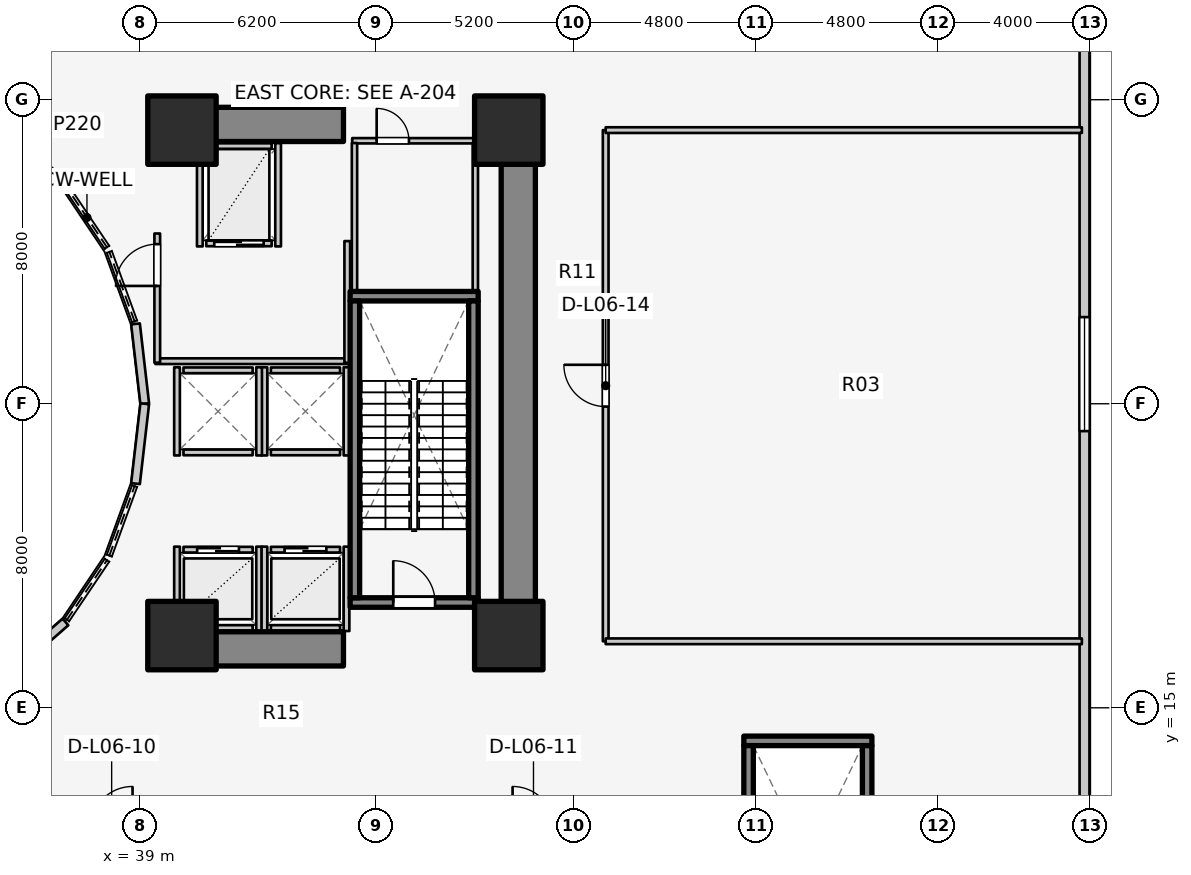
"""IFC4 building model, lengths in metres.
Left out: names, types, materials, properties, quantities, classifications, styles, units other than length and angle.
Written with IfcOpenShell. Run it as: python <this file> out.ifc"""

import sys

from ifc_helpers import new_model, si_unit, direction, frame, frame_2d, origin, origin_2d, place, context, subcontext, project, spatial, rectangle, extrude, element, fill, save


model = new_model("IFC4")
c1 = context("Model", 3, precision=1e-05, world=origin(), true_north=direction((0.0, 1.0)))
c2 = subcontext(c1, "Body", "Model", "MODEL_VIEW")
j1 = project(units=[si_unit("LENGTHUNIT", "METRE"), si_unit("PLANEANGLEUNIT", "RADIAN")], contexts=[c1])
p1 = place(None, origin())
s1 = spatial("IfcSite", under=j1, at=p1, CompositionType="ELEMENT")
p2 = place(p1, origin())
s2 = spatial("IfcBuilding", under=s1, at=p2, CompositionType="ELEMENT")
p3 = place(p2, frame((0.0, 0.0, 23.0)))
s3 = spatial("IfcBuildingStorey", under=s2, at=p3, CompositionType="ELEMENT", Elevation=23.0)
p4 = place(p3, frame((48.95, 17.05, 0.0), z_axis=(0.0, 0.0, 1.0), x_axis=(0.0, 1.0, 0.0)))
e1 = element("IfcWall", 1, at=p4, inside=s3, PredefinedType="SHEAR", context=c2, shape_type="SweptSolid", body=[
    extrude(rectangle(XDim=12.8, YDim=0.9, at=frame_2d((6.4, 0.0))), origin(), (0.0, 0.0, 1.0), 4.6),
])
for number, where, z_axis, x_axis in (
    (2, (39.85, 16.55, 0.0), (0.0, 0.0, 1.0), (1.0, 0.0, 0.0)),
    (3, (39.85, 30.35, 0.0), (0.0, 0.0, 1.0), (1.0, 0.0, 0.0)),
):
    element("IfcWall", number, at=place(p3, frame(where, z_axis=z_axis, x_axis=x_axis)), inside=s3, PredefinedType="SHEAR", context=c2, shape_type="SweptSolid", body=[
        extrude(rectangle(XDim=4.5, YDim=0.9, at=frame_2d((2.25, 0.0))), origin(), (0.0, 0.0, 1.0), 4.6),
    ])
p5 = place(p3, frame((44.525, 17.77, 0.0), z_axis=(0.0, 0.0, 1.0), x_axis=(1.0, 0.0, 0.0)))
e4 = element("IfcWall", 4, at=p5, inside=s3, PredefinedType="SOLIDWALL", context=c2, shape_type="SweptSolid", body=[
    extrude(rectangle(XDim=3.37, YDim=0.25, at=frame_2d((1.685, 0.0))), origin(), (0.0, 0.0, 1.0), 4.6),
])
p6 = place(p5, frame((1.135, 0.0, 0.0)))
e5 = element("IfcOpeningElement", 5, at=p6, cuts=e4, PredefinedType="OPENING", context=c2, shape_type="SweptSolid", body=[
    extrude(rectangle(XDim=1.1, YDim=2.1, at=frame_2d((0.55, 1.05))), frame((0.0, 0.135, 0.0), z_axis=(0.0, -1.0, 0.0), x_axis=(1.0, 0.0, 0.0)), (0.0, 0.0, 1.0), 0.27),
])
p7 = place(p3, frame((44.525, 25.83, 0.0), z_axis=(0.0, 0.0, 1.0), x_axis=(1.0, 0.0, 0.0)))
e6 = element("IfcWall", 6, at=p7, inside=s3, PredefinedType="SOLIDWALL", context=c2, shape_type="SweptSolid", body=[
    extrude(rectangle(XDim=3.37, YDim=0.25, at=frame_2d((1.685, 0.0))), origin(), (0.0, 0.0, 1.0), 4.6),
])
for number, where, z_axis, x_axis in (
    (7, (44.65, 17.895, 0.0), (0.0, 0.0, 1.0), (0.0, 1.0, 0.0)),
    (8, (47.77, 17.895, 0.0), (0.0, 0.0, 1.0), (0.0, 1.0, 0.0)),
):
    element("IfcWall", number, at=place(p3, frame(where, z_axis=z_axis, x_axis=x_axis)), inside=s3, PredefinedType="SOLIDWALL", context=c2, shape_type="SweptSolid", body=[
        extrude(rectangle(XDim=7.81, YDim=0.25, at=frame_2d((3.905, 0.0))), origin(), (0.0, 0.0, 1.0), 4.6),
    ])
p8 = place(p3, frame((54.885, 14.13, 0.0), z_axis=(0.0, 0.0, 1.0), x_axis=(1.0, 0.0, 0.0)))
e9 = element("IfcWall", 9, at=p8, inside=s3, PredefinedType="SOLIDWALL", context=c2, shape_type="SweptSolid", body=[
    extrude(rectangle(XDim=3.37, YDim=0.25, at=frame_2d((1.685, 0.0))), origin(), (0.0, 0.0, 1.0), 4.6),
])
for number, where, z_axis, x_axis in (
    (10, (55.01, 6.195, 0.0), (0.0, 0.0, 1.0), (0.0, 1.0, 0.0)),
    (11, (58.13, 6.195, 0.0), (0.0, 0.0, 1.0), (0.0, 1.0, 0.0)),
):
    element("IfcWall", number, at=place(p3, frame(where, z_axis=z_axis, x_axis=x_axis)), inside=s3, PredefinedType="SOLIDWALL", context=c2, shape_type="SweptSolid", body=[
        extrude(rectangle(XDim=7.81, YDim=0.25, at=frame_2d((3.905, 0.0))), origin(), (0.0, 0.0, 1.0), 4.6),
    ])
for number, where, z_axis, x_axis in (
    (12, (40.1, 16.9, 0.0), (0.0, 0.0, 1.0), (1.0, 0.0, 0.0)),
    (13, (48.7, 16.9, 0.0), (0.0, 0.0, 1.0), (1.0, 0.0, 0.0)),
    (14, (48.7, 30.2, 0.0), (0.0, 0.0, 1.0), (1.0, 0.0, 0.0)),
    (15, (40.1, 30.2, 0.0), (0.0, 0.0, 1.0), (1.0, 0.0, 0.0)),
):
    element("IfcColumn", number, at=place(p3, frame(where, z_axis=z_axis, x_axis=x_axis)), inside=s3, PredefinedType="COLUMN", context=c2, shape_type="SweptSolid", body=[
        extrude(rectangle(XDim=1.8, YDim=1.8, at=origin_2d()), origin(), (0.0, 0.0, 1.0), 4.6),
    ])
p9 = place(p3, frame((63.85, 0.28, 0.0), z_axis=(0.0, 0.0, 1.0), x_axis=(0.0, 1.0, 0.0)))
e16 = element("IfcWall", 16, at=p9, inside=s3, PredefinedType="STANDARD", context=c2, shape_type="SweptSolid", body=[
    extrude(rectangle(XDim=45.44, YDim=0.26, at=frame_2d((22.72, 0.0))), origin(), (0.0, 0.0, 1.0), 4.1),
])
p10 = place(p9, frame((6.0, 0.0, 0.9)))
e17 = element("IfcOpeningElement", 17, at=p10, cuts=e16, PredefinedType="OPENING", context=c2, shape_type="SweptSolid", body=[
    extrude(rectangle(XDim=3.0, YDim=2.4, at=frame_2d((1.5, 1.2))), frame((0.0, 0.14, 0.0), z_axis=(0.0, -1.0, 0.0), x_axis=(1.0, 0.0, 0.0)), (0.0, 0.0, 1.0), 0.28),
])
p11 = place(p9, frame((22.0, 0.0, 0.9)))
e18 = element("IfcOpeningElement", 18, at=p11, cuts=e16, PredefinedType="OPENING", context=c2, shape_type="SweptSolid", body=[
    extrude(rectangle(XDim=3.0, YDim=2.4, at=frame_2d((1.5, 1.2))), frame((0.0, 0.14, 0.0), z_axis=(0.0, -1.0, 0.0), x_axis=(1.0, 0.0, 0.0)), (0.0, 0.0, 1.0), 0.28),
])
p12 = place(p9, frame((38.0, 0.0, 0.9)))
e19 = element("IfcOpeningElement", 19, at=p12, cuts=e16, PredefinedType="OPENING", context=c2, shape_type="SweptSolid", body=[
    extrude(rectangle(XDim=3.0, YDim=2.4, at=frame_2d((1.5, 1.2))), frame((0.0, 0.14, 0.0), z_axis=(0.0, -1.0, 0.0), x_axis=(1.0, 0.0, 0.0)), (0.0, 0.0, 1.0), 0.28),
])
p13 = place(p3, frame((39.12, 23.0, 0.0), z_axis=(0.0, 0.0, 1.0), x_axis=(-0.114711713601, 0.993398823617, 0.0)))
e20 = element("IfcWall", 20, at=p13, inside=s3, PredefinedType="STANDARD", context=c2, shape_type="SweptSolid", body=[
    extrude(rectangle(XDim=2.115, YDim=0.23, at=frame_2d((1.058, 0.0))), origin(), (0.0, 0.0, 1.0), 2.67),
])
for number, where, z_axis, x_axis in (
    (21, (37.035, 28.742, 0.0), (0.0, 0.0, 1.0), (-0.753, 0.659, 0.0)),
    (22, (35.56, 15.968, 0.0), (0.0, 0.0, 1.0), (0.753, 0.659, 0.0)),
):
    element("IfcWall", number, at=place(p3, frame(where, z_axis=z_axis, x_axis=x_axis)), inside=s3, PredefinedType="STANDARD", context=c2, shape_type="SweptSolid", body=[
        extrude(rectangle(XDim=1.959, YDim=0.23, at=frame_2d((0.98, 0.0))), origin(), (0.0, 0.0, 1.0), 2.67),
    ])
p14 = place(p3, frame((38.877, 20.898, 0.0), z_axis=(0.0, 0.0, 1.0), x_axis=(0.114711713601, 0.993398823617, 0.0)))
e23 = element("IfcWall", 23, at=p14, inside=s3, PredefinedType="STANDARD", context=c2, shape_type="SweptSolid", body=[
    extrude(rectangle(XDim=2.115, YDim=0.23, at=frame_2d((1.058, 0.0))), origin(), (0.0, 0.0, 1.0), 2.67),
])
p15 = place(p3, frame((40.14, 19.16, 0.0), z_axis=(0.0, 0.0, 1.0), x_axis=(1.0, 0.0, 0.0)))
e24 = element("IfcWall", 24, at=p15, inside=s3, PredefinedType="SOLIDWALL", context=c2, shape_type="SweptSolid", body=[
    extrude(rectangle(XDim=1.82, YDim=0.15, at=frame_2d((0.91, 0.0))), origin(), (0.0, 0.0, 1.0), 3.62),
])
p16 = place(p15, frame((0.36, 0.0, 0.0)))
e25 = element("IfcOpeningElement", 25, at=p16, cuts=e24, PredefinedType="OPENING", context=c2, shape_type="SweptSolid", body=[
    extrude(rectangle(XDim=1.1, YDim=2.1, at=frame_2d((0.55, 1.05))), frame((0.0, 0.085, 0.0), z_axis=(0.0, -1.0, 0.0), x_axis=(1.0, 0.0, 0.0)), (0.0, 0.0, 1.0), 0.17),
])
p17 = place(p3, frame((40.14, 17.1, 0.0), z_axis=(0.0, 0.0, 1.0), x_axis=(1.0, 0.0, 0.0)))
e26 = element("IfcWall", 26, at=p17, inside=s3, PredefinedType="SOLIDWALL", context=c2, shape_type="SweptSolid", body=[
    extrude(rectangle(XDim=1.82, YDim=0.15, at=frame_2d((0.91, 0.0))), origin(), (0.0, 0.0, 1.0), 2.67),
])
p18 = place(p3, frame((39.97, 17.02, 0.0), z_axis=(0.0, 0.0, 1.0), x_axis=(0.0, 1.0, 0.0)))
e27 = element("IfcWall", 27, at=p18, inside=s3, PredefinedType="SOLIDWALL", context=c2, shape_type="SweptSolid", body=[
    extrude(rectangle(XDim=2.22, YDim=0.15, at=frame_2d((1.11, 0.0))), origin(), (0.0, 0.0, 1.0), 2.67),
])
p19 = place(p3, frame((42.13, 17.02, 0.0), z_axis=(0.0, 0.0, 1.0), x_axis=(0.0, 1.0, 0.0)))
e28 = element("IfcWall", 28, at=p19, inside=s3, PredefinedType="SOLIDWALL", context=c2, shape_type="SweptSolid", body=[
    extrude(rectangle(XDim=2.22, YDim=0.15, at=frame_2d((1.11, 0.0))), origin(), (0.0, 0.0, 1.0), 4.075),
])
p20 = place(p3, frame((42.44, 19.16, 0.0), z_axis=(0.0, 0.0, 1.0), x_axis=(1.0, 0.0, 0.0)))
e29 = element("IfcWall", 29, at=p20, inside=s3, PredefinedType="SOLIDWALL", context=c2, shape_type="SweptSolid", body=[
    extrude(rectangle(XDim=1.82, YDim=0.15, at=frame_2d((0.91, 0.0))), origin(), (0.0, 0.0, 1.0), 4.075),
])
p21 = place(p20, frame((0.36, 0.0, 0.0)))
e30 = element("IfcOpeningElement", 30, at=p21, cuts=e29, PredefinedType="OPENING", context=c2, shape_type="SweptSolid", body=[
    extrude(rectangle(XDim=1.1, YDim=2.1, at=frame_2d((0.55, 1.05))), frame((0.0, 0.085, 0.0), z_axis=(0.0, -1.0, 0.0), x_axis=(1.0, 0.0, 0.0)), (0.0, 0.0, 1.0), 0.17),
])
p22 = place(p3, frame((42.44, 17.1, 0.0), z_axis=(0.0, 0.0, 1.0), x_axis=(1.0, 0.0, 0.0)))
e31 = element("IfcWall", 31, at=p22, inside=s3, PredefinedType="SOLIDWALL", context=c2, shape_type="SweptSolid", body=[
    extrude(rectangle(XDim=1.82, YDim=0.15, at=frame_2d((0.91, 0.0))), origin(), (0.0, 0.0, 1.0), 4.075),
])
p23 = place(p3, frame((42.27, 17.02, 0.0), z_axis=(0.0, 0.0, 1.0), x_axis=(0.0, 1.0, 0.0)))
e32 = element("IfcWall", 32, at=p23, inside=s3, PredefinedType="SOLIDWALL", context=c2, shape_type="SweptSolid", body=[
    extrude(rectangle(XDim=2.22, YDim=0.15, at=frame_2d((1.11, 0.0))), origin(), (0.0, 0.0, 1.0), 4.075),
])
p24 = place(p3, frame((44.43, 17.02, 0.0), z_axis=(0.0, 0.0, 1.0), x_axis=(0.0, 1.0, 0.0)))
e33 = element("IfcWall", 33, at=p24, inside=s3, PredefinedType="SOLIDWALL", context=c2, shape_type="SweptSolid", body=[
    extrude(rectangle(XDim=2.22, YDim=0.15, at=frame_2d((1.11, 0.0))), origin(), (0.0, 0.0, 1.0), 3.62),
])
for number, where, z_axis, x_axis in (
    (34, (42.44, 21.72, 0.0), (0.0, 0.0, 1.0), (1.0, 0.0, 0.0)),
    (35, (42.44, 23.88, 0.0), (0.0, 0.0, 1.0), (1.0, 0.0, 0.0)),
):
    element("IfcWall", number, at=place(p3, frame(where, z_axis=z_axis, x_axis=x_axis)), inside=s3, PredefinedType="SOLIDWALL", context=c2, shape_type="SweptSolid", body=[
        extrude(rectangle(XDim=1.82, YDim=0.15, at=frame_2d((0.91, 0.0))), origin(), (0.0, 0.0, 1.0), 4.075),
    ])
for number, where, z_axis, x_axis in (
    (36, (42.27, 21.64, 0.0), (0.0, 0.0, 1.0), (0.0, 1.0, 0.0)),
    (37, (44.43, 21.64, 0.0), (0.0, 0.0, 1.0), (0.0, 1.0, 0.0)),
):
    element("IfcWall", number, at=place(p3, frame(where, z_axis=z_axis, x_axis=x_axis)), inside=s3, PredefinedType="SOLIDWALL", context=c2, shape_type="SweptSolid", body=[
        extrude(rectangle(XDim=2.32, YDim=0.15, at=frame_2d((1.16, 0.0))), origin(), (0.0, 0.0, 1.0), 4.075),
    ])
for number, where, z_axis, x_axis in (
    (38, (40.14, 21.72, 0.0), (0.0, 0.0, 1.0), (1.0, 0.0, 0.0)),
    (39, (40.14, 23.88, 0.0), (0.0, 0.0, 1.0), (1.0, 0.0, 0.0)),
):
    element("IfcWall", number, at=place(p3, frame(where, z_axis=z_axis, x_axis=x_axis)), inside=s3, PredefinedType="SOLIDWALL", context=c2, shape_type="SweptSolid", body=[
        extrude(rectangle(XDim=1.82, YDim=0.15, at=frame_2d((0.91, 0.0))), origin(), (0.0, 0.0, 1.0), 3.62),
    ])
p25 = place(p3, frame((39.97, 21.64, 0.0), z_axis=(0.0, 0.0, 1.0), x_axis=(0.0, 1.0, 0.0)))
e40 = element("IfcWall", 40, at=p25, inside=s3, PredefinedType="SOLIDWALL", context=c2, shape_type="SweptSolid", body=[
    extrude(rectangle(XDim=2.32, YDim=0.15, at=frame_2d((1.16, 0.0))), origin(), (0.0, 0.0, 1.0), 3.62),
])
p26 = place(p3, frame((42.13, 21.64, 0.0), z_axis=(0.0, 0.0, 1.0), x_axis=(0.0, 1.0, 0.0)))
e41 = element("IfcWall", 41, at=p26, inside=s3, PredefinedType="SOLIDWALL", context=c2, shape_type="SweptSolid", body=[
    extrude(rectangle(XDim=2.32, YDim=0.15, at=frame_2d((1.16, 0.0))), origin(), (0.0, 0.0, 1.0), 4.075),
])
p27 = place(p3, frame((40.74, 27.22, 0.0), z_axis=(0.0, 0.0, 1.0), x_axis=(1.0, 0.0, 0.0)))
e42 = element("IfcWall", 42, at=p27, inside=s3, PredefinedType="SOLIDWALL", context=c2, shape_type="SweptSolid", body=[
    extrude(rectangle(XDim=1.72, YDim=0.15, at=frame_2d((0.86, 0.0))), origin(), (0.0, 0.0, 1.0), 4.075),
])
p28 = place(p27, frame((0.21, 0.0, 0.0)))
e43 = element("IfcOpeningElement", 43, at=p28, cuts=e42, PredefinedType="OPENING", context=c2, shape_type="SweptSolid", body=[
    extrude(rectangle(XDim=1.3, YDim=2.1, at=frame_2d((0.65, 1.05))), frame((0.0, 0.085, 0.0), z_axis=(0.0, -1.0, 0.0), x_axis=(1.0, 0.0, 0.0)), (0.0, 0.0, 1.0), 0.17),
])
p29 = place(p3, frame((40.74, 29.78, 0.0), z_axis=(0.0, 0.0, 1.0), x_axis=(1.0, 0.0, 0.0)))
e44 = element("IfcWall", 44, at=p29, inside=s3, PredefinedType="SOLIDWALL", context=c2, shape_type="SweptSolid", body=[
    extrude(rectangle(XDim=1.72, YDim=0.15, at=frame_2d((0.86, 0.0))), origin(), (0.0, 0.0, 1.0), 4.075),
])
for number, where, z_axis, x_axis in (
    (45, (40.57, 27.14, 0.0), (0.0, 0.0, 1.0), (0.0, 1.0, 0.0)),
    (46, (42.63, 27.14, 0.0), (0.0, 0.0, 1.0), (0.0, 1.0, 0.0)),
):
    element("IfcWall", number, at=place(p3, frame(where, z_axis=z_axis, x_axis=x_axis)), inside=s3, PredefinedType="SOLIDWALL", context=c2, shape_type="SweptSolid", body=[
        extrude(rectangle(XDim=2.72, YDim=0.15, at=frame_2d((1.36, 0.0))), origin(), (0.0, 0.0, 1.0), 4.075),
    ])
p30 = place(p3, frame((39.4, 24.12, 0.0), z_axis=(0.0, 0.0, 1.0), x_axis=(1.0, 0.0, 0.0)))
e47 = element("IfcWall", 47, at=p30, inside=s3, PredefinedType="PARTITIONING", context=c2, shape_type="SweptSolid", body=[
    extrude(rectangle(XDim=5.08, YDim=0.15, at=frame_2d((2.54, 0.0))), origin(), (0.0, 0.0, 1.0), 3.62),
])
p31 = place(p3, frame((44.45, 24.08, 0.0), z_axis=(0.0, 0.0, 1.0), x_axis=(0.0, 1.0, 0.0)))
e48 = element("IfcWall", 48, at=p31, inside=s3, PredefinedType="PARTITIONING", context=c2, shape_type="SweptSolid", body=[
    extrude(rectangle(XDim=3.2, YDim=0.15, at=frame_2d((1.6, 0.0))), origin(), (0.0, 0.0, 1.0), 4.075),
])
p32 = place(p3, frame((39.45, 24.08, 0.0), z_axis=(0.0, 0.0, 1.0), x_axis=(0.0, 1.0, 0.0)))
e49 = element("IfcWall", 49, at=p32, inside=s3, PredefinedType="PARTITIONING", context=c2, shape_type="SweptSolid", body=[
    extrude(rectangle(XDim=3.4, YDim=0.15, at=frame_2d((1.7, 0.0))), origin(), (0.0, 0.0, 1.0), 4.075),
])
p33 = place(p32, frame((2.02, 0.0, 0.0)))
e50 = element("IfcOpeningElement", 50, at=p33, cuts=e49, PredefinedType="OPENING", context=c2, shape_type="SweptSolid", body=[
    extrude(rectangle(XDim=1.1, YDim=2.1, at=frame_2d((0.55, 1.05))), frame((0.0, 0.085, 0.0), z_axis=(0.0, -1.0, 0.0), x_axis=(1.0, 0.0, 0.0)), (0.0, 0.0, 1.0), 0.17),
])
p34 = place(p3, frame((51.25, 16.75, 0.0), z_axis=(0.0, 0.0, 1.0), x_axis=(0.0, 1.0, 0.0)))
e51 = element("IfcWall", 51, at=p34, inside=s3, PredefinedType="PARTITIONING", context=c2, shape_type="SweptSolid", body=[
    extrude(rectangle(XDim=13.45, YDim=0.15, at=frame_2d((6.725, 0.0))), origin(), (0.0, 0.0, 1.0), 4.075),
])
p35 = place(p34, frame((6.175, 0.0, 0.0)))
e52 = element("IfcOpeningElement", 52, at=p35, cuts=e51, PredefinedType="OPENING", context=c2, shape_type="SweptSolid", body=[
    extrude(rectangle(XDim=1.1, YDim=2.1, at=frame_2d((0.55, 1.05))), frame((0.0, 0.085, 0.0), z_axis=(0.0, -1.0, 0.0), x_axis=(1.0, 0.0, 0.0)), (0.0, 0.0, 1.0), 0.17),
])
for number, where, z_axis, x_axis in (
    (53, (51.25, 16.75, 0.0), (0.0, 0.0, 1.0), (1.0, 0.0, 0.0)),
    (54, (51.25, 30.2, 0.0), (0.0, 0.0, 1.0), (1.0, 0.0, 0.0)),
):
    element("IfcWall", number, at=place(p3, frame(where, z_axis=z_axis, x_axis=x_axis)), inside=s3, PredefinedType="PARTITIONING", context=c2, shape_type="SweptSolid", body=[
        extrude(rectangle(XDim=12.53, YDim=0.15, at=frame_2d((6.265, 0.0))), origin(), (0.0, 0.0, 1.0), 2.67),
    ])
p36 = place(p3, frame((44.58, 29.92, 0.0), z_axis=(0.0, 0.0, 1.0), x_axis=(1.0, 0.0, 0.0)))
e55 = element("IfcWall", 55, at=p36, inside=s3, PredefinedType="PLUMBINGWALL", context=c2, shape_type="SweptSolid", body=[
    extrude(rectangle(XDim=3.3, YDim=0.14, at=frame_2d((1.65, 0.0))), origin(), (0.0, 0.0, 1.0), 4.075),
])
p37 = place(p36, frame((0.643, 0.0, 0.0)))
e56 = element("IfcOpeningElement", 56, at=p37, cuts=e55, PredefinedType="OPENING", context=c2, shape_type="SweptSolid", body=[
    extrude(rectangle(XDim=0.85, YDim=2.05, at=frame_2d((0.425, 1.025))), frame((0.0, 0.08, 0.0), z_axis=(0.0, -1.0, 0.0), x_axis=(1.0, 0.0, 0.0)), (0.0, 0.0, 1.0), 0.16),
])
for number, where, z_axis, x_axis in (
    (57, (44.64, 25.98, 0.0), (0.0, 0.0, 1.0), (0.0, 1.0, 0.0)),
    (58, (47.82, 25.98, 0.0), (0.0, 0.0, 1.0), (0.0, 1.0, 0.0)),
):
    element("IfcWall", number, at=place(p3, frame(where, z_axis=z_axis, x_axis=x_axis)), inside=s3, PredefinedType="PLUMBINGWALL", context=c2, shape_type="SweptSolid", body=[
        extrude(rectangle(XDim=3.88, YDim=0.14, at=frame_2d((1.94, 0.0))), origin(), (0.0, 0.0, 1.0), 4.075),
    ])
p38 = place(p11, origin())
e59 = element("IfcWindow", 59, at=p38, inside=s3, PartitioningType="SINGLE_PANEL", PredefinedType="WINDOW", context=c2, shape_type="SweptSolid", body=[
    extrude(rectangle(XDim=3.0, YDim=2.4, at=frame_2d((1.5, 1.2))), frame((0.0, 0.03, 0.0), z_axis=(0.0, -1.0, 0.0), x_axis=(1.0, 0.0, 0.0)), (0.0, 0.0, 1.0), 0.06),
])
fill(e18, e59)
p39 = place(p6, origin())
e60 = element("IfcDoor", 60, at=p39, inside=s3, OperationType="SINGLE_SWING_LEFT", PredefinedType="DOOR", context=c2, shape_type="SweptSolid", body=[
    extrude(rectangle(XDim=1.1, YDim=2.1, at=frame_2d((0.55, 1.05))), frame((0.0, 0.025, 0.0), z_axis=(0.0, -1.0, 0.0), x_axis=(1.0, 0.0, 0.0)), (0.0, 0.0, 1.0), 0.05),
])
fill(e5, e60)
p40 = place(p16, origin())
e61 = element("IfcDoor", 61, at=p40, inside=s3, OperationType="DOUBLE_DOOR_SLIDING", PredefinedType="DOOR", context=c2, shape_type="SweptSolid", body=[
    extrude(rectangle(XDim=1.1, YDim=2.1, at=frame_2d((0.55, 1.05))), frame((0.0, 0.025, 0.0), z_axis=(0.0, -1.0, 0.0), x_axis=(1.0, 0.0, 0.0)), (0.0, 0.0, 1.0), 0.05),
])
fill(e25, e61)
p41 = place(p21, origin())
e62 = element("IfcDoor", 62, at=p41, inside=s3, OperationType="DOUBLE_DOOR_SLIDING", PredefinedType="DOOR", context=c2, shape_type="SweptSolid", body=[
    extrude(rectangle(XDim=1.1, YDim=2.1, at=frame_2d((0.55, 1.05))), frame((0.0, 0.025, 0.0), z_axis=(0.0, -1.0, 0.0), x_axis=(1.0, 0.0, 0.0)), (0.0, 0.0, 1.0), 0.05),
])
fill(e30, e62)
p42 = place(p28, origin())
e63 = element("IfcDoor", 63, at=p42, inside=s3, OperationType="DOUBLE_DOOR_SLIDING", PredefinedType="DOOR", context=c2, shape_type="SweptSolid", body=[
    extrude(rectangle(XDim=1.3, YDim=2.1, at=frame_2d((0.65, 1.05))), frame((0.0, 0.025, 0.0), z_axis=(0.0, -1.0, 0.0), x_axis=(1.0, 0.0, 0.0)), (0.0, 0.0, 1.0), 0.05),
])
fill(e43, e63)
p43 = place(p33, origin())
e64 = element("IfcDoor", 64, at=p43, inside=s3, OperationType="SINGLE_SWING_LEFT", PredefinedType="DOOR", context=c2, shape_type="SweptSolid", body=[
    extrude(rectangle(XDim=1.1, YDim=2.1, at=frame_2d((0.55, 1.05))), frame((0.0, 0.025, 0.0), z_axis=(0.0, -1.0, 0.0), x_axis=(1.0, 0.0, 0.0)), (0.0, 0.0, 1.0), 0.05),
])
fill(e50, e64)
p44 = place(p35, origin())
e65 = element("IfcDoor", 65, at=p44, inside=s3, OperationType="SINGLE_SWING_RIGHT", PredefinedType="DOOR", context=c2, shape_type="SweptSolid", body=[
    extrude(rectangle(XDim=1.1, YDim=2.1, at=frame_2d((0.55, 1.05))), frame((0.0, 0.025, 0.0), z_axis=(0.0, -1.0, 0.0), x_axis=(1.0, 0.0, 0.0)), (0.0, 0.0, 1.0), 0.05),
])
fill(e52, e65)
p45 = place(p37, origin())
e66 = element("IfcDoor", 66, at=p45, inside=s3, OperationType="SINGLE_SWING_LEFT", PredefinedType="DOOR", context=c2, shape_type="SweptSolid", body=[
    extrude(rectangle(XDim=0.85, YDim=2.05, at=frame_2d((0.425, 1.025))), frame((0.0, 0.025, 0.0), z_axis=(0.0, -1.0, 0.0), x_axis=(1.0, 0.0, 0.0)), (0.0, 0.0, 1.0), 0.05),
])
fill(e56, e66)
save(model, sys.argv[1])
